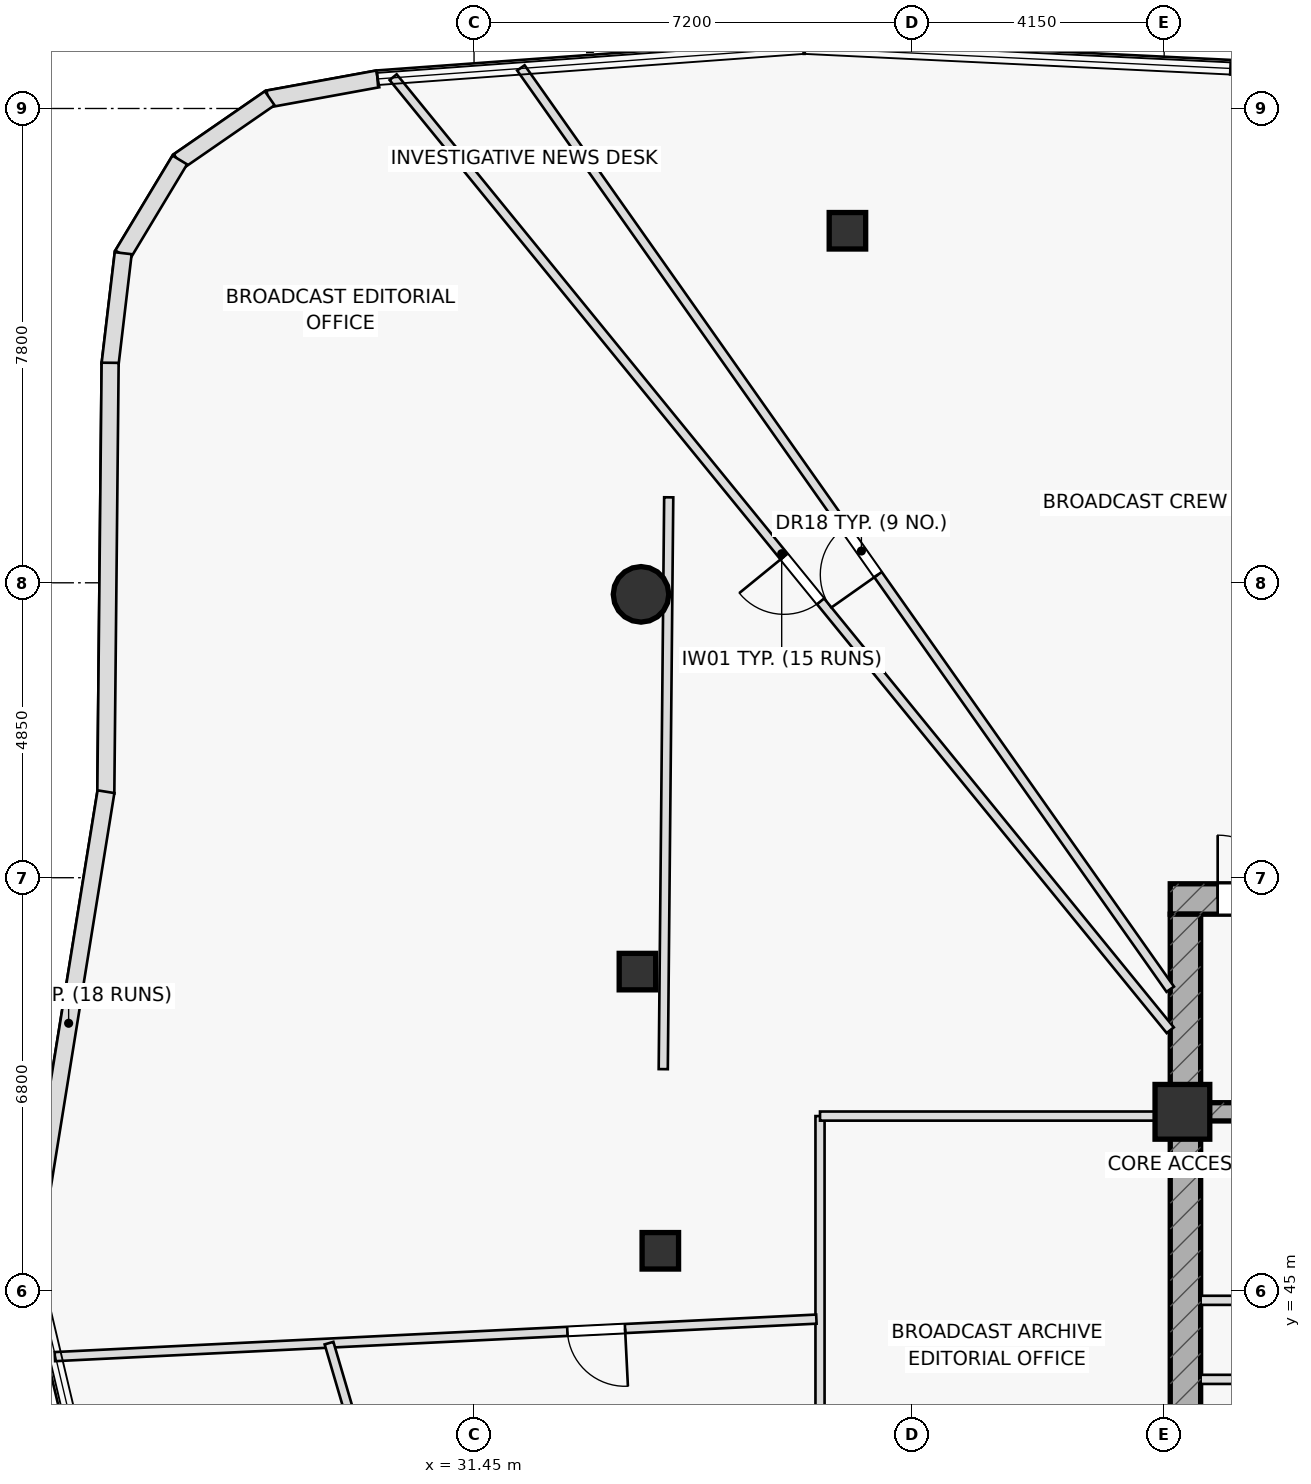
"""IFC4 building model, lengths in metres.
Left out: names, types, materials, properties, quantities, classifications, styles, units other than length and angle.
Written with IfcOpenShell. Run it as: python <this file> out.ifc"""

import sys

from ifc_helpers import new_model, si_unit, direction, frame, frame_2d, origin, origin_2d, place, context, subcontext, project, spatial, rectangle, hollow_rectangle, hollow_circle, extrude, element, fill, save


model = new_model("IFC4")
c1 = context("Model", 3, precision=1e-05, world=origin(), true_north=direction((0.0, 1.0)))
c2 = subcontext(c1, "Body", "Model", "MODEL_VIEW")
j1 = project(units=[si_unit("LENGTHUNIT", "METRE"), si_unit("PLANEANGLEUNIT", "RADIAN")], contexts=[c1])
p1 = place(None, origin())
s1 = spatial("IfcSite", under=j1, at=p1, CompositionType="ELEMENT")
p2 = place(p1, origin())
s2 = spatial("IfcBuilding", under=s1, at=p2, CompositionType="ELEMENT")
p3 = place(p2, frame((0.0, 0.0, 237.95)))
s3 = spatial("IfcBuildingStorey", under=s2, at=p3, CompositionType="ELEMENT", Elevation=237.95)
p4 = place(p3, frame((42.9, 51.45, 0.0), z_axis=(0.0, 0.0, 1.0), x_axis=(1.0, 0.0, 0.0)))
e1 = element("IfcWall", 1, at=p4, inside=s3, PredefinedType="SHEAR", context=c2, shape_type="SweptSolid", body=[
    extrude(rectangle(XDim=14.2, YDim=0.5, at=frame_2d((7.1, 0.0))), origin(), (0.0, 0.0, 1.0), 3.65),
])
p5 = place(p4, frame((0.78, 0.0, 0.0)))
e2 = element("IfcOpeningElement", 2, at=p5, cuts=e1, PredefinedType="OPENING", context=c2, shape_type="SweptSolid", body=[
    extrude(rectangle(XDim=1.05, YDim=2.2, at=frame_2d((0.525, 1.1))), frame((0.0, 0.26, 0.0), z_axis=(0.0, -1.0, 0.0), x_axis=(1.0, 0.0, 0.0)), (0.0, 0.0, 1.0), 0.52),
])
p6 = place(p3, frame((43.15, 38.8, 0.0), z_axis=(0.0, 0.0, 1.0), x_axis=(0.0, 1.0, 0.0)))
e3 = element("IfcWall", 3, at=p6, inside=s3, PredefinedType="SHEAR", context=c2, shape_type="SweptSolid", body=[
    extrude(rectangle(XDim=12.4, YDim=0.5, at=frame_2d((6.2, 0.0))), origin(), (0.0, 0.0, 1.0), 3.65),
])
p7 = place(p3, frame((43.4, 47.95, 0.0), z_axis=(0.0, 0.0, 1.0), x_axis=(1.0, 0.0, 0.0)))
e4 = element("IfcWall", 4, at=p7, inside=s3, PredefinedType="SHEAR", context=c2, shape_type="SweptSolid", body=[
    extrude(rectangle(XDim=13.2, YDim=0.3, at=frame_2d((6.6, 0.0))), origin(), (0.0, 0.0, 1.0), 3.65),
])
p8 = place(p7, frame((8.345, 0.0, 0.0)))
e5 = element("IfcOpeningElement", 5, at=p8, cuts=e4, PredefinedType="OPENING", context=c2, shape_type="SweptSolid", body=[
    extrude(rectangle(XDim=1.15, YDim=2.2, at=frame_2d((0.575, 1.1))), frame((0.0, 0.16, 0.0), z_axis=(0.0, -1.0, 0.0), x_axis=(1.0, 0.0, 0.0)), (0.0, 0.0, 1.0), 0.32),
])
p9 = place(p7, frame((10.065, 0.0, 0.0)))
e6 = element("IfcOpeningElement", 6, at=p9, cuts=e4, PredefinedType="OPENING", context=c2, shape_type="SweptSolid", body=[
    extrude(rectangle(XDim=1.15, YDim=2.2, at=frame_2d((0.575, 1.1))), frame((0.0, 0.16, 0.0), z_axis=(0.0, -1.0, 0.0), x_axis=(1.0, 0.0, 0.0)), (0.0, 0.0, 1.0), 0.32),
])
p10 = place(p7, frame((11.645, 0.0, 0.0)))
e7 = element("IfcOpeningElement", 7, at=p10, cuts=e4, PredefinedType="OPENING", context=c2, shape_type="SweptSolid", body=[
    extrude(rectangle(XDim=1.15, YDim=2.2, at=frame_2d((0.575, 1.1))), frame((0.0, 0.16, 0.0), z_axis=(0.0, -1.0, 0.0), x_axis=(1.0, 0.0, 0.0)), (0.0, 0.0, 1.0), 0.32),
])
p11 = place(p3, frame((43.1, 47.95, 0.0), z_axis=(0.0, 0.0, 1.0), x_axis=(1.0, 0.0, 0.0)))
e8 = element("IfcColumn", 8, at=p11, inside=s3, PredefinedType="COLUMN", context=c2, shape_type="SweptSolid", body=[
    extrude(rectangle(XDim=0.9, YDim=0.9, at=origin_2d()), origin(), (0.0, 0.0, 1.0), 3.65),
])
p12 = place(p3, frame((34.196, 56.46, 0.0), z_axis=(0.0, 0.0, 1.0), x_axis=(1.0, 0.0, 0.0)))
e9 = element("IfcColumn", 9, at=p12, inside=s3, PredefinedType="COLUMN", context=c2, shape_type="SweptSolid", body=[
    extrude(hollow_circle(Radius=0.457, WallThickness=0.04, at=origin_2d()), origin(), (0.0, 0.0, 1.0), 3.65),
])
for number, where, z_axis, x_axis in (
    (10, (34.137, 50.256, 0.0), (0.0, 0.0, 1.0), (1.0, 0.0, 0.0)),
    (11, (34.514, 45.665, 0.0), (0.0, 0.0, 1.0), (1.0, 0.0, 0.0)),
    (12, (37.591, 62.439, 0.0), (0.0, 0.0, 1.0), (1.0, 0.0, 0.0)),
):
    element("IfcColumn", number, at=place(p3, frame(where, z_axis=z_axis, x_axis=x_axis)), inside=s3, PredefinedType="COLUMN", context=c2, shape_type="SweptSolid", body=[
        extrude(hollow_rectangle(XDim=0.6, YDim=0.6, WallThickness=0.036, at=origin_2d()), origin(), (0.0, 0.0, 1.0), 3.65),
    ])
for number, where, z_axis, x_axis in (
    (13, (43.4, 43.55, 0.0), (0.0, 0.0, 1.0), (1.0, 0.0, 0.0)),
    (14, (43.4, 44.85, 0.0), (0.0, 0.0, 1.0), (1.0, 0.0, 0.0)),
):
    element("IfcWall", number, at=place(p3, frame(where, z_axis=z_axis, x_axis=x_axis)), inside=s3, PredefinedType="PARTITIONING", context=c2, shape_type="SweptSolid", body=[
        extrude(rectangle(XDim=2.35, YDim=0.15, at=frame_2d((1.175, 0.0))), origin(), (0.0, 0.0, 1.0), 3.65),
    ])
p13 = place(p3, frame((34.652, 58.056, 0.0), z_axis=(0.0, 0.0, 1.0), x_axis=(-0.009553538759, -0.999954363907, 0.0)))
e15 = element("IfcWall", 15, at=p13, inside=s3, PredefinedType="PARTITIONING", context=c2, shape_type="SweptSolid", body=[
    extrude(rectangle(XDim=9.404, YDim=0.15, at=frame_2d((4.702, 0.0))), origin(), (0.0, 0.0, 1.0), 3.135),
])
p14 = place(p3, frame((37.14, 40.3, 0.0), z_axis=(0.0, 0.0, 1.0), x_axis=(0.0, 1.0, 0.0)))
e16 = element("IfcWall", 16, at=p14, inside=s3, PredefinedType="PARTITIONING", context=c2, shape_type="SweptSolid", body=[
    extrude(rectangle(XDim=7.58, YDim=0.15, at=frame_2d((3.79, 0.0))), origin(), (0.0, 0.0, 1.0), 3.65),
])
p15 = place(p3, frame((37.14, 47.88, 0.0), z_axis=(0.0, 0.0, 1.0), x_axis=(1.0, 0.0, 0.0)))
e17 = element("IfcWall", 17, at=p15, inside=s3, PredefinedType="PARTITIONING", context=c2, shape_type="SweptSolid", body=[
    extrude(rectangle(XDim=5.76, YDim=0.15, at=frame_2d((2.88, 0.0))), origin(), (0.0, 0.0, 1.0), 3.025),
])
p16 = place(p3, frame((42.9, 49.966, 0.0), z_axis=(0.0, 0.0, 1.0), x_axis=(-0.576086344137, 0.817388845103, 0.0)))
e18 = element("IfcWall", 18, at=p16, inside=s3, PredefinedType="PARTITIONING", context=c2, shape_type="SweptSolid", body=[
    extrude(rectangle(XDim=18.538, YDim=0.15, at=frame_2d((9.269, 0.0))), origin(), (0.0, 0.0, 1.0), 3.025),
])
p17 = place(p16, frame((8.342, 0.0, 0.0)))
e19 = element("IfcOpeningElement", 19, at=p17, cuts=e18, PredefinedType="OPENING", context=c2, shape_type="SweptSolid", body=[
    extrude(rectangle(XDim=0.95, YDim=2.05, at=frame_2d((0.475, 1.025))), frame((0.0, 0.085, 0.0), z_axis=(0.0, -1.0, 0.0), x_axis=(1.0, 0.0, 0.0)), (0.0, 0.0, 1.0), 0.17),
])
p18 = place(p3, frame((42.9, 49.292, 0.0), z_axis=(0.0, 0.0, 1.0), x_axis=(-0.631970108663, 0.77499276239, 0.0)))
e20 = element("IfcWall", 20, at=p18, inside=s3, PredefinedType="PARTITIONING", context=c2, shape_type="SweptSolid", body=[
    extrude(rectangle(XDim=20.223, YDim=0.15, at=frame_2d((10.111, 0.0))), origin(), (0.0, 0.0, 1.0), 3.025),
])
p19 = place(p18, frame((9.1, 0.0, 0.0)))
e21 = element("IfcOpeningElement", 21, at=p19, cuts=e20, PredefinedType="OPENING", context=c2, shape_type="SweptSolid", body=[
    extrude(rectangle(XDim=0.95, YDim=2.05, at=frame_2d((0.475, 1.025))), frame((0.0, 0.085, 0.0), z_axis=(0.0, -1.0, 0.0), x_axis=(1.0, 0.0, 0.0)), (0.0, 0.0, 1.0), 0.17),
])
p20 = place(p3, frame((37.08, 44.541, 0.0), z_axis=(0.0, 0.0, 1.0), x_axis=(-0.998789781413, -0.049183051404, 0.0)))
e22 = element("IfcWall", 22, at=p20, inside=s3, PredefinedType="PARTITIONING", context=c2, shape_type="SweptSolid", body=[
    extrude(rectangle(XDim=12.539, YDim=0.15, at=frame_2d((6.27, 0.0))), origin(), (0.0, 0.0, 1.0), 3.135),
])
p21 = place(p20, frame((3.15, 0.0, 0.0)))
e23 = element("IfcOpeningElement", 23, at=p21, cuts=e22, PredefinedType="OPENING", context=c2, shape_type="SweptSolid", body=[
    extrude(rectangle(XDim=0.95, YDim=2.05, at=frame_2d((0.475, 1.025))), frame((0.0, 0.085, 0.0), z_axis=(0.0, -1.0, 0.0), x_axis=(1.0, 0.0, 0.0)), (0.0, 0.0, 1.0), 0.17),
])
p22 = place(p3, frame((29.065, 44.146, 0.0), z_axis=(0.0, 0.0, 1.0), x_axis=(0.281946161772, -0.95943022772, 0.0)))
e24 = element("IfcWall", 24, at=p22, inside=s3, PredefinedType="PARTITIONING", context=c2, shape_type="SweptSolid", body=[
    extrude(rectangle(XDim=8.225, YDim=0.15, at=frame_2d((4.113, 0.0))), origin(), (0.0, 0.0, 1.0), 3.65),
])
p23 = place(p22, frame((3.638, 0.0, 0.0)))
e25 = element("IfcOpeningElement", 25, at=p23, cuts=e24, PredefinedType="OPENING", context=c2, shape_type="SweptSolid", body=[
    extrude(rectangle(XDim=0.95, YDim=2.05, at=frame_2d((0.475, 1.025))), frame((0.0, 0.085, 0.0), z_axis=(0.0, -1.0, 0.0), x_axis=(1.0, 0.0, 0.0)), (0.0, 0.0, 1.0), 0.17),
])
p24 = place(p3, frame((29.866, 64.937, 0.0), z_axis=(0.0, 0.0, 1.0), x_axis=(-0.983739710088, -0.17960006346, 0.0)))
e26 = element("IfcWall", 26, at=p24, inside=s3, PredefinedType="STANDARD", context=c2, shape_type="SweptSolid", body=[
    extrude(rectangle(XDim=1.834, YDim=0.28, at=frame_2d((0.917, 0.0))), origin(), (0.0, 0.0, 1.0), 3.65),
])
p25 = place(p3, frame((28.089, 64.618, 0.0), z_axis=(0.0, 0.0, 1.0), x_axis=(-0.822573078876, -0.568659414684, 0.0)))
e27 = element("IfcWall", 27, at=p25, inside=s3, PredefinedType="STANDARD", context=c2, shape_type="SweptSolid", body=[
    extrude(rectangle(XDim=1.822, YDim=0.28, at=frame_2d((0.911, 0.0))), origin(), (0.0, 0.0, 1.0), 3.65),
])
p26 = place(p3, frame((26.611, 63.604, 0.0), z_axis=(0.0, 0.0, 1.0), x_axis=(-0.515775755585, -0.856723625186, 0.0)))
e28 = element("IfcWall", 28, at=p26, inside=s3, PredefinedType="STANDARD", context=c2, shape_type="SweptSolid", body=[
    extrude(rectangle(XDim=1.822, YDim=0.28, at=frame_2d((0.911, 0.0))), origin(), (0.0, 0.0, 1.0), 3.65),
])
p27 = place(p3, frame((25.68, 62.07, 0.0), z_axis=(0.0, 0.0, 1.0), x_axis=(-0.117516916599, -0.99307088081, 0.0)))
e29 = element("IfcWall", 29, at=p27, inside=s3, PredefinedType="STANDARD", context=c2, shape_type="SweptSolid", body=[
    extrude(rectangle(XDim=1.845, YDim=0.28, at=frame_2d((0.922, 0.0))), origin(), (0.0, 0.0, 1.0), 3.65),
])
p28 = place(p3, frame((25.465, 60.268, 0.0), z_axis=(0.0, 0.0, 1.0), x_axis=(-0.010063250538, -0.999949364212, 0.0)))
e30 = element("IfcWall", 30, at=p28, inside=s3, PredefinedType="STANDARD", context=c2, shape_type="SweptSolid", body=[
    extrude(rectangle(XDim=7.084, YDim=0.28, at=frame_2d((3.542, 0.0))), origin(), (0.0, 0.0, 1.0), 3.65),
])
p29 = place(p3, frame((25.396, 53.214, 0.0), z_axis=(0.0, 0.0, 1.0), x_axis=(-0.159151844827, -0.987254116369, 0.0)))
e31 = element("IfcWall", 31, at=p29, inside=s3, PredefinedType="STANDARD", context=c2, shape_type="SweptSolid", body=[
    extrude(rectangle(XDim=7.715, YDim=0.28, at=frame_2d((3.857, 0.0))), origin(), (0.0, 0.0, 1.0), 3.65),
])
p30 = place(p5, origin())
e32 = element("IfcDoor", 32, at=p30, inside=s3, OperationType="SINGLE_SWING_LEFT", PredefinedType="DOOR", context=c2, shape_type="SweptSolid", body=[
    extrude(rectangle(XDim=1.05, YDim=2.2, at=frame_2d((0.525, 1.1))), frame((0.0, 0.025, 0.0), z_axis=(0.0, -1.0, 0.0), x_axis=(1.0, 0.0, 0.0)), (0.0, 0.0, 1.0), 0.05),
])
fill(e2, e32)
p31 = place(p17, origin())
e33 = element("IfcDoor", 33, at=p31, inside=s3, OperationType="SINGLE_SWING_LEFT", PredefinedType="DOOR", context=c2, shape_type="SweptSolid", body=[
    extrude(rectangle(XDim=0.95, YDim=2.05, at=frame_2d((0.475, 1.025))), frame((0.0, 0.025, 0.0), z_axis=(0.0, -1.0, 0.0), x_axis=(1.0, 0.0, 0.0)), (0.0, 0.0, 1.0), 0.05),
])
fill(e19, e33)
p32 = place(p19, origin())
e34 = element("IfcDoor", 34, at=p32, inside=s3, OperationType="SINGLE_SWING_RIGHT", PredefinedType="DOOR", context=c2, shape_type="SweptSolid", body=[
    extrude(rectangle(XDim=0.95, YDim=2.05, at=frame_2d((0.475, 1.025))), frame((0.0, 0.025, 0.0), z_axis=(0.0, -1.0, 0.0), x_axis=(1.0, 0.0, 0.0)), (0.0, 0.0, 1.0), 0.05),
])
fill(e21, e34)
p33 = place(p21, origin())
e35 = element("IfcDoor", 35, at=p33, inside=s3, OperationType="SINGLE_SWING_LEFT", PredefinedType="DOOR", context=c2, shape_type="SweptSolid", body=[
    extrude(rectangle(XDim=0.95, YDim=2.05, at=frame_2d((0.475, 1.025))), frame((0.0, 0.025, 0.0), z_axis=(0.0, -1.0, 0.0), x_axis=(1.0, 0.0, 0.0)), (0.0, 0.0, 1.0), 0.05),
])
fill(e23, e35)
save(model, sys.argv[1])
